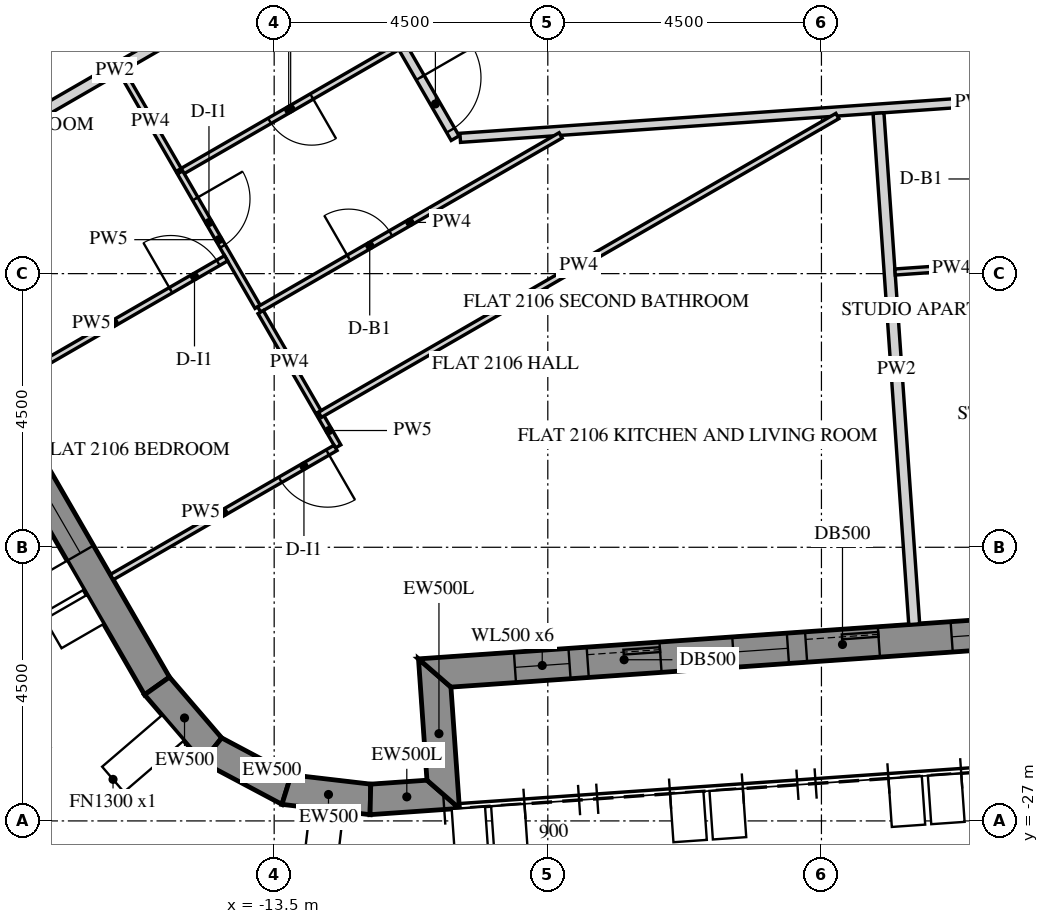
"""IFC4 building model, lengths in metres.
Left out: names, types, materials, properties, quantities, classifications, styles, units other than length and angle.
Written with IfcOpenShell. Run it as: python <this file> out.ifc"""

import sys

from ifc_helpers import new_model, si_unit, direction, frame, frame_2d, origin, place, context, subcontext, project, spatial, polyline, rectangle, outline, extrude, element, fill, save


model = new_model("IFC4")
c1 = context("Model", 3, precision=1e-05, world=origin(), true_north=direction((0.0, 1.0)))
c2 = subcontext(c1, "Body", "Model", "MODEL_VIEW")
j1 = project(units=[si_unit("LENGTHUNIT", "METRE"), si_unit("PLANEANGLEUNIT", "RADIAN")], contexts=[c1])
p1 = place(None, origin())
s1 = spatial("IfcSite", under=j1, at=p1, CompositionType="ELEMENT")
p2 = place(p1, origin())
s2 = spatial("IfcBuilding", under=s1, at=p2, CompositionType="ELEMENT")
p3 = place(p2, frame((0.0, 0.0, 267.9)))
s3 = spatial("IfcBuildingStorey", under=s2, at=p3, CompositionType="ELEMENT", Elevation=267.9)
p4 = place(p3, frame((-28.149, -2.745, -0.15), z_axis=(0.0, 0.0, 1.0), x_axis=(0.500003737743, -0.866023245787, 0.0)))
e1 = element("IfcWall", 1, at=p4, inside=s3, PredefinedType="SOLIDWALL", context=c2, shape_type="SweptSolid", body=[
    extrude(outline(polyline([(-0.021, -0.25), (25.468, -0.25), (25.421, 0.25), (0.021, 0.25), (-0.021, -0.25)])), origin(), (0.0, 0.0, 1.0), 3.9),
])
p5 = place(p4, frame((2.522, 0.0, 0.75)))
e2 = element("IfcOpeningElement", 2, at=p5, cuts=e1, PredefinedType="OPENING", context=c2, shape_type="SweptSolid", body=[
    extrude(rectangle(XDim=2.4, YDim=2.7, at=frame_2d((1.2, 1.35))), frame((0.0, 0.26, 0.0), z_axis=(0.0, -1.0, 0.0), x_axis=(1.0, 0.0, 0.0)), (0.0, 0.0, 1.0), 0.52),
])
p6 = place(p4, frame((6.122, 0.0, 0.75)))
e3 = element("IfcOpeningElement", 3, at=p6, cuts=e1, PredefinedType="OPENING", context=c2, shape_type="SweptSolid", body=[
    extrude(rectangle(XDim=2.4, YDim=2.7, at=frame_2d((1.2, 1.35))), frame((0.0, 0.26, 0.0), z_axis=(0.0, -1.0, 0.0), x_axis=(1.0, 0.0, 0.0)), (0.0, 0.0, 1.0), 0.52),
])
p7 = place(p4, frame((9.722, 0.0, 0.75)))
e4 = element("IfcOpeningElement", 4, at=p7, cuts=e1, PredefinedType="OPENING", context=c2, shape_type="SweptSolid", body=[
    extrude(rectangle(XDim=2.4, YDim=2.7, at=frame_2d((1.2, 1.35))), frame((0.0, 0.26, 0.0), z_axis=(0.0, -1.0, 0.0), x_axis=(1.0, 0.0, 0.0)), (0.0, 0.0, 1.0), 0.52),
])
p8 = place(p4, frame((13.323, 0.0, 0.75)))
e5 = element("IfcOpeningElement", 5, at=p8, cuts=e1, PredefinedType="OPENING", context=c2, shape_type="SweptSolid", body=[
    extrude(rectangle(XDim=2.4, YDim=2.7, at=frame_2d((1.2, 1.35))), frame((0.0, 0.26, 0.0), z_axis=(0.0, -1.0, 0.0), x_axis=(1.0, 0.0, 0.0)), (0.0, 0.0, 1.0), 0.52),
])
p9 = place(p4, frame((16.922, 0.0, 0.75)))
e6 = element("IfcOpeningElement", 6, at=p9, cuts=e1, PredefinedType="OPENING", context=c2, shape_type="SweptSolid", body=[
    extrude(rectangle(XDim=2.4, YDim=2.7, at=frame_2d((1.2, 1.35))), frame((0.0, 0.26, 0.0), z_axis=(0.0, -1.0, 0.0), x_axis=(1.0, 0.0, 0.0)), (0.0, 0.0, 1.0), 0.52),
])
p10 = place(p4, frame((20.522, 0.0, 0.75)))
e7 = element("IfcOpeningElement", 7, at=p10, cuts=e1, PredefinedType="OPENING", context=c2, shape_type="SweptSolid", body=[
    extrude(rectangle(XDim=2.4, YDim=2.7, at=frame_2d((1.2, 1.35))), frame((0.0, 0.26, 0.0), z_axis=(0.0, -1.0, 0.0), x_axis=(1.0, 0.0, 0.0)), (0.0, 0.0, 1.0), 0.52),
])
p11 = place(p3, frame((-15.427, -24.78, -0.15), z_axis=(0.0, 0.0, 1.0), x_axis=(0.651616566281, -0.758548515619, 0.0)))
e8 = element("IfcWall", 8, at=p11, inside=s3, PredefinedType="SOLIDWALL", context=c2, shape_type="SweptSolid", body=[
    extrude(outline(polyline([(-0.023, -0.25), (1.435, -0.25), (1.341, 0.25), (0.023, 0.25), (-0.023, -0.25)])), origin(), (0.0, 0.0, 1.0), 3.9),
])
p12 = place(p3, frame((-14.522, -25.833, -0.15), z_axis=(0.0, 0.0, 1.0), x_axis=(0.882926676147, -0.469510899286, 0.0)))
e9 = element("IfcWall", 9, at=p12, inside=s3, PredefinedType="SOLIDWALL", context=c2, shape_type="SweptSolid", body=[
    extrude(outline(polyline([(-0.047, -0.25), (1.436, -0.25), (1.341, 0.25), (0.047, 0.25), (-0.047, -0.25)])), origin(), (0.0, 0.0, 1.0), 3.9),
])
p13 = place(p3, frame((-13.296, -26.485, -0.15), z_axis=(0.0, 0.0, 1.0), x_axis=(0.993239161627, -0.116086036245, 0.0)))
e10 = element("IfcWall", 10, at=p13, inside=s3, PredefinedType="SOLIDWALL", context=c2, shape_type="SweptSolid", body=[
    extrude(outline(polyline([(-0.047, -0.25), (1.411, -0.25), (1.365, 0.25), (0.047, 0.25), (-0.047, -0.25)])), origin(), (0.0, 0.0, 1.0), 3.9),
])
p14 = place(p3, frame((-11.917, -26.646, -0.15), z_axis=(0.0, 0.0, 1.0), x_axis=(0.997562933087, 0.069772448216, 0.0)))
e11 = element("IfcWall", 11, at=p14, inside=s3, PredefinedType="SOLIDWALL", context=c2, shape_type="SweptSolid", body=[
    extrude(outline(polyline([(-0.023, -0.25), (1.45, -0.25), (0.95, 0.25), (0.023, 0.25), (-0.023, -0.25)])), origin(), (0.0, 0.0, 1.0), 3.9),
])
p15 = place(p3, frame((-10.72, -26.562, -0.15), z_axis=(0.0, 0.0, 1.0), x_axis=(-0.069824268692, 0.99755930726, 0.0)))
e12 = element("IfcWall", 12, at=p15, inside=s3, PredefinedType="SOLIDWALL", context=c2, shape_type="SweptSolid", body=[
    extrude(outline(polyline([(-0.25, -0.25), (1.75, -0.25), (2.25, 0.25), (0.25, 0.25), (-0.25, -0.25)])), origin(), (0.0, 0.0, 1.0), 3.9),
])
p16 = place(p3, frame((-10.86, -24.567, -0.15), z_axis=(0.0, 0.0, 1.0), x_axis=(0.997564329317, 0.06975248292, 0.0)))
e13 = element("IfcWall", 13, at=p16, inside=s3, PredefinedType="SOLIDWALL", context=c2, shape_type="SweptSolid", body=[
    extrude(outline(polyline([(0.25, -0.25), (22.795, -0.25), (23.295, 0.25), (-0.25, 0.25), (0.25, -0.25)])), origin(), (0.0, 0.0, 1.0), 3.9),
])
p17 = place(p16, frame((1.323, 0.0, 1.05)))
e14 = element("IfcOpeningElement", 14, at=p17, cuts=e13, PredefinedType="OPENING", context=c2, shape_type="SweptSolid", body=[
    extrude(rectangle(XDim=0.9, YDim=1.5, at=frame_2d((0.45, 0.75))), frame((0.0, 0.26, 0.0), z_axis=(0.0, -1.0, 0.0), x_axis=(1.0, 0.0, 0.0)), (0.0, 0.0, 1.0), 0.52),
])
p18 = place(p16, frame((2.522, 0.0, 0.15)))
e15 = element("IfcOpeningElement", 15, at=p18, cuts=e13, PredefinedType="OPENING", context=c2, shape_type="SweptSolid", body=[
    extrude(rectangle(XDim=1.2, YDim=2.4, at=frame_2d((0.6, 1.2))), frame((0.0, 0.26, 0.0), z_axis=(0.0, -1.0, 0.0), x_axis=(1.0, 0.0, 0.0)), (0.0, 0.0, 1.0), 0.52),
])
p19 = place(p16, frame((4.922, 0.0, 1.05)))
e16 = element("IfcOpeningElement", 16, at=p19, cuts=e13, PredefinedType="OPENING", context=c2, shape_type="SweptSolid", body=[
    extrude(rectangle(XDim=0.9, YDim=1.5, at=frame_2d((0.45, 0.75))), frame((0.0, 0.26, 0.0), z_axis=(0.0, -1.0, 0.0), x_axis=(1.0, 0.0, 0.0)), (0.0, 0.0, 1.0), 0.52),
])
p20 = place(p16, frame((6.122, 0.0, 0.15)))
e17 = element("IfcOpeningElement", 17, at=p20, cuts=e13, PredefinedType="OPENING", context=c2, shape_type="SweptSolid", body=[
    extrude(rectangle(XDim=1.2, YDim=2.4, at=frame_2d((0.6, 1.2))), frame((0.0, 0.26, 0.0), z_axis=(0.0, -1.0, 0.0), x_axis=(1.0, 0.0, 0.0)), (0.0, 0.0, 1.0), 0.52),
])
p21 = place(p16, frame((8.522, 0.0, 1.05)))
e18 = element("IfcOpeningElement", 18, at=p21, cuts=e13, PredefinedType="OPENING", context=c2, shape_type="SweptSolid", body=[
    extrude(rectangle(XDim=0.9, YDim=1.5, at=frame_2d((0.45, 0.75))), frame((0.0, 0.26, 0.0), z_axis=(0.0, -1.0, 0.0), x_axis=(1.0, 0.0, 0.0)), (0.0, 0.0, 1.0), 0.52),
])
p22 = place(p16, frame((9.722, 0.0, 0.15)))
e19 = element("IfcOpeningElement", 19, at=p22, cuts=e13, PredefinedType="OPENING", context=c2, shape_type="SweptSolid", body=[
    extrude(rectangle(XDim=1.2, YDim=2.4, at=frame_2d((0.6, 1.2))), frame((0.0, 0.26, 0.0), z_axis=(0.0, -1.0, 0.0), x_axis=(1.0, 0.0, 0.0)), (0.0, 0.0, 1.0), 0.52),
])
p23 = place(p16, frame((12.122, 0.0, 1.05)))
e20 = element("IfcOpeningElement", 20, at=p23, cuts=e13, PredefinedType="OPENING", context=c2, shape_type="SweptSolid", body=[
    extrude(rectangle(XDim=0.9, YDim=1.5, at=frame_2d((0.45, 0.75))), frame((0.0, 0.26, 0.0), z_axis=(0.0, -1.0, 0.0), x_axis=(1.0, 0.0, 0.0)), (0.0, 0.0, 1.0), 0.52),
])
p24 = place(p16, frame((13.323, 0.0, 0.15)))
e21 = element("IfcOpeningElement", 21, at=p24, cuts=e13, PredefinedType="OPENING", context=c2, shape_type="SweptSolid", body=[
    extrude(rectangle(XDim=1.2, YDim=2.4, at=frame_2d((0.6, 1.2))), frame((0.0, 0.26, 0.0), z_axis=(0.0, -1.0, 0.0), x_axis=(1.0, 0.0, 0.0)), (0.0, 0.0, 1.0), 0.52),
])
p25 = place(p16, frame((15.722, 0.0, 1.05)))
e22 = element("IfcOpeningElement", 22, at=p25, cuts=e13, PredefinedType="OPENING", context=c2, shape_type="SweptSolid", body=[
    extrude(rectangle(XDim=0.9, YDim=1.5, at=frame_2d((0.45, 0.75))), frame((0.0, 0.26, 0.0), z_axis=(0.0, -1.0, 0.0), x_axis=(1.0, 0.0, 0.0)), (0.0, 0.0, 1.0), 0.52),
])
p26 = place(p16, frame((16.922, 0.0, 0.15)))
e23 = element("IfcOpeningElement", 23, at=p26, cuts=e13, PredefinedType="OPENING", context=c2, shape_type="SweptSolid", body=[
    extrude(rectangle(XDim=1.2, YDim=2.4, at=frame_2d((0.6, 1.2))), frame((0.0, 0.26, 0.0), z_axis=(0.0, -1.0, 0.0), x_axis=(1.0, 0.0, 0.0)), (0.0, 0.0, 1.0), 0.52),
])
p27 = place(p16, frame((19.323, 0.0, 1.05)))
e24 = element("IfcOpeningElement", 24, at=p27, cuts=e13, PredefinedType="OPENING", context=c2, shape_type="SweptSolid", body=[
    extrude(rectangle(XDim=0.9, YDim=1.5, at=frame_2d((0.45, 0.75))), frame((0.0, 0.26, 0.0), z_axis=(0.0, -1.0, 0.0), x_axis=(1.0, 0.0, 0.0)), (0.0, 0.0, 1.0), 0.52),
])
p28 = place(p16, frame((20.522, 0.0, 0.15)))
e25 = element("IfcOpeningElement", 25, at=p28, cuts=e13, PredefinedType="OPENING", context=c2, shape_type="SweptSolid", body=[
    extrude(rectangle(XDim=1.2, YDim=2.4, at=frame_2d((0.6, 1.2))), frame((0.0, 0.26, 0.0), z_axis=(0.0, -1.0, 0.0), x_axis=(1.0, 0.0, 0.0)), (0.0, 0.0, 1.0), 0.52),
])
p29 = place(p3, frame((-17.998, -2.826, 0.0), z_axis=(0.0, 0.0, 1.0), x_axis=(0.500003306199, -0.866023494941, 0.0)))
e26 = element("IfcWall", 26, at=p29, inside=s3, PredefinedType="PARTITIONING", context=c2, shape_type="SweptSolid", body=[
    extrude(rectangle(XDim=14.949, YDim=0.15, at=frame_2d((7.475, 0.0))), origin(), (0.0, 0.0, 1.0), 2.988),
])
p30 = place(p29, frame((2.925, 0.0, 0.0)))
e27 = element("IfcOpeningElement", 27, at=p30, cuts=e26, PredefinedType="OPENING", context=c2, shape_type="SweptSolid", body=[
    extrude(rectangle(XDim=1.0, YDim=2.1, at=frame_2d((0.5, 1.05))), frame((0.0, 0.085, 0.0), z_axis=(0.0, -1.0, 0.0), x_axis=(1.0, 0.0, 0.0)), (0.0, 0.0, 1.0), 0.17),
])
p31 = place(p29, frame((13.799, 0.0, 0.0)))
e28 = element("IfcOpeningElement", 28, at=p31, cuts=e26, PredefinedType="OPENING", context=c2, shape_type="SweptSolid", body=[
    extrude(rectangle(XDim=1.0, YDim=2.1, at=frame_2d((0.5, 1.05))), frame((0.0, 0.085, 0.0), z_axis=(0.0, -1.0, 0.0), x_axis=(1.0, 0.0, 0.0)), (0.0, 0.0, 1.0), 0.17),
])
p32 = place(p3, frame((-10.44, -15.767, 0.0), z_axis=(0.0, 0.0, 1.0), x_axis=(0.997565037323, 0.069742356651, 0.0)))
e29 = element("IfcWall", 29, at=p32, inside=s3, PredefinedType="PARTITIONING", context=c2, shape_type="SweptSolid", body=[
    extrude(rectangle(XDim=16.939, YDim=0.15, at=frame_2d((8.47, 0.0))), origin(), (0.0, 0.0, 1.0), 2.988),
])
p33 = place(p32, frame((9.79, 0.0, 0.0)))
e30 = element("IfcOpeningElement", 30, at=p33, cuts=e29, PredefinedType="OPENING", context=c2, shape_type="SweptSolid", body=[
    extrude(rectangle(XDim=1.0, YDim=2.1, at=frame_2d((0.5, 1.05))), frame((0.0, 0.085, 0.0), z_axis=(0.0, -1.0, 0.0), x_axis=(1.0, 0.0, 0.0)), (0.0, 0.0, 1.0), 0.17),
])
p34 = place(p32, frame((15.39, 0.0, 0.0)))
e31 = element("IfcOpeningElement", 31, at=p34, cuts=e29, PredefinedType="OPENING", context=c2, shape_type="SweptSolid", body=[
    extrude(rectangle(XDim=1.0, YDim=2.1, at=frame_2d((0.5, 1.05))), frame((0.0, 0.085, 0.0), z_axis=(0.0, -1.0, 0.0), x_axis=(1.0, 0.0, 0.0)), (0.0, 0.0, 1.0), 0.17),
])
p35 = place(p3, frame((-19.771, -16.755, 0.0), z_axis=(0.0, 0.0, 1.0), x_axis=(0.866026819143, 0.499997548519, 0.0)))
e32 = element("IfcWall", 32, at=p35, inside=s3, PredefinedType="PARTITIONING", context=c2, shape_type="SweptSolid", body=[
    extrude(rectangle(XDim=8.425, YDim=0.18, at=frame_2d((4.212, 0.0))), origin(), (0.0, 0.0, 1.0), 2.988),
])
p36 = place(p3, frame((-12.748, -20.319, 0.0), z_axis=(0.0, 0.0, 1.0), x_axis=(0.500108649621, -0.865962665808, 0.0)))
e33 = element("IfcWall", 33, at=p36, inside=s3, PredefinedType="PARTITIONING", context=c2, shape_type="SweptSolid", body=[
    extrude(rectangle(XDim=0.602, YDim=0.1, at=frame_2d((0.301, 0.0))), origin(), (0.0, 0.0, 1.0), 2.988),
])
p37 = place(p3, frame((-12.491, -20.865, 0.0), z_axis=(0.0, 0.0, 1.0), x_axis=(-0.866014341725, -0.50001915956, 0.0)))
e34 = element("IfcWall", 34, at=p37, inside=s3, PredefinedType="PARTITIONING", context=c2, shape_type="SweptSolid", body=[
    extrude(rectangle(XDim=4.25, YDim=0.1, at=frame_2d((2.125, 0.0))), origin(), (0.0, 0.0, 1.0), 2.988),
])
p38 = place(p37, frame((0.15, 0.0, 0.0)))
e35 = element("IfcOpeningElement", 35, at=p38, cuts=e34, PredefinedType="OPENING", context=c2, shape_type="SweptSolid", body=[
    extrude(rectangle(XDim=0.9, YDim=2.1, at=frame_2d((0.45, 1.05))), frame((0.0, 0.06, 0.0), z_axis=(0.0, -1.0, 0.0), x_axis=(1.0, 0.0, 0.0)), (0.0, 0.0, 1.0), 0.12),
])
p39 = place(p3, frame((-4.238, -15.408, 0.0), z_axis=(0.0, 0.0, 1.0), x_axis=(-0.86602504101, -0.500000628343, 0.0)))
e36 = element("IfcWall", 36, at=p39, inside=s3, PredefinedType="PARTITIONING", context=c2, shape_type="SweptSolid", body=[
    extrude(rectangle(XDim=9.826, YDim=0.1, at=frame_2d((4.913, 0.0))), origin(), (0.0, 0.0, 1.0), 2.988),
])
p40 = place(p3, frame((-2.974, -23.765, 0.0), z_axis=(0.0, 0.0, 1.0), x_axis=(-0.069749826803, 0.997564515037, 0.0)))
e37 = element("IfcWall", 37, at=p40, inside=s3, PredefinedType="PARTITIONING", context=c2, shape_type="SweptSolid", body=[
    extrude(rectangle(XDim=8.425, YDim=0.18, at=frame_2d((4.212, 0.0))), origin(), (0.0, 0.0, 1.0), 2.988),
])
p41 = place(p3, frame((-11.475, -14.275, 0.0), z_axis=(0.0, 0.0, 1.0), x_axis=(-0.866019999656, -0.500009360108, 0.0)))
e38 = element("IfcWall", 38, at=p41, inside=s3, PredefinedType="PARTITIONING", context=c2, shape_type="SweptSolid", body=[
    extrude(rectangle(XDim=4.125, YDim=0.1, at=frame_2d((2.062, 0.0))), origin(), (0.0, 0.0, 1.0), 2.988),
])
p42 = place(p41, frame((1.625, 0.0, 0.0)))
e39 = element("IfcOpeningElement", 39, at=p42, cuts=e38, PredefinedType="OPENING", context=c2, shape_type="SweptSolid", body=[
    extrude(rectangle(XDim=0.8, YDim=2.1, at=frame_2d((0.4, 1.05))), frame((0.0, 0.06, 0.0), z_axis=(0.0, -1.0, 0.0), x_axis=(1.0, 0.0, 0.0)), (0.0, 0.0, 1.0), 0.12),
])
p43 = place(p3, frame((-15.048, -16.335, 0.0), z_axis=(0.0, 0.0, 1.0), x_axis=(0.500014808323, -0.866016854026, 0.0)))
e40 = element("IfcWall", 40, at=p43, inside=s3, PredefinedType="PARTITIONING", context=c2, shape_type="SweptSolid", body=[
    extrude(rectangle(XDim=2.554, YDim=0.1, at=frame_2d((1.277, 0.0))), origin(), (0.0, 0.0, 1.0), 2.988),
])
p44 = place(p43, frame((0.502, 0.0, 0.0)))
e41 = element("IfcOpeningElement", 41, at=p44, cuts=e40, PredefinedType="OPENING", context=c2, shape_type="SweptSolid", body=[
    extrude(rectangle(XDim=0.9, YDim=2.1, at=frame_2d((0.45, 1.05))), frame((0.0, 0.06, 0.0), z_axis=(0.0, -1.0, 0.0), x_axis=(1.0, 0.0, 0.0)), (0.0, 0.0, 1.0), 0.12),
])
p45 = place(p3, frame((-13.747, -18.589, 0.0), z_axis=(0.0, 0.0, 1.0), x_axis=(0.866022251081, 0.500005460603, 0.0)))
e42 = element("IfcWall", 42, at=p45, inside=s3, PredefinedType="PARTITIONING", context=c2, shape_type="SweptSolid", body=[
    extrude(rectangle(XDim=5.725, YDim=0.1, at=frame_2d((2.863, 0.0))), origin(), (0.0, 0.0, 1.0), 2.988),
])
p46 = place(p45, frame((1.7, 0.0, 0.0)))
e43 = element("IfcOpeningElement", 43, at=p46, cuts=e42, PredefinedType="OPENING", context=c2, shape_type="SweptSolid", body=[
    extrude(rectangle(XDim=0.8, YDim=2.1, at=frame_2d((0.4, 1.05))), frame((0.0, 0.06, 0.0), z_axis=(0.0, -1.0, 0.0), x_axis=(1.0, 0.0, 0.0)), (0.0, 0.0, 1.0), 0.12),
])
p47 = place(p3, frame((-16.002, -14.683, 0.0), z_axis=(0.0, 0.0, 1.0), x_axis=(0.500059143742, -0.865991254436, 0.0)))
e44 = element("IfcWall", 44, at=p47, inside=s3, PredefinedType="PARTITIONING", context=c2, shape_type="SweptSolid", body=[
    extrude(rectangle(XDim=1.862, YDim=0.1, at=frame_2d((0.931, 0.0))), origin(), (0.0, 0.0, 1.0), 2.988),
])
p48 = place(p3, frame((-17.971, -19.873, 0.0), z_axis=(0.0, 0.0, 1.0), x_axis=(0.866028703517, 0.499994284652, 0.0)))
e45 = element("IfcWall", 45, at=p48, inside=s3, PredefinedType="PARTITIONING", context=c2, shape_type="SweptSolid", body=[
    extrude(rectangle(XDim=4.25, YDim=0.1, at=frame_2d((2.125, 0.0))), origin(), (0.0, 0.0, 1.0), 2.988),
])
p49 = place(p48, frame((3.2, 0.0, 0.0)))
e46 = element("IfcOpeningElement", 46, at=p49, cuts=e45, PredefinedType="OPENING", context=c2, shape_type="SweptSolid", body=[
    extrude(rectangle(XDim=0.9, YDim=2.1, at=frame_2d((0.45, 1.05))), frame((0.0, 0.06, 0.0), z_axis=(0.0, -1.0, 0.0), x_axis=(1.0, 0.0, 0.0)), (0.0, 0.0, 1.0), 0.12),
])
p50 = place(p3, frame((-12.772, -20.278, 0.0), z_axis=(0.0, 0.0, 1.0), x_axis=(-0.499967155389, 0.866044365799, 0.0)))
e47 = element("IfcWall", 47, at=p50, inside=s3, PredefinedType="PARTITIONING", context=c2, shape_type="SweptSolid", body=[
    extrude(rectangle(XDim=1.9, YDim=0.1, at=frame_2d((0.95, 0.0))), origin(), (0.0, 0.0, 1.0), 2.988),
])
p51 = place(p3, frame((-1.434, -17.844, 0.0), z_axis=(0.0, 0.0, 1.0), x_axis=(-0.997568101915, -0.069698508173, 0.0)))
e48 = element("IfcWall", 48, at=p51, inside=s3, PredefinedType="PARTITIONING", context=c2, shape_type="SweptSolid", body=[
    extrude(rectangle(XDim=1.86, YDim=0.1, at=frame_2d((0.93, 0.0))), origin(), (0.0, 0.0, 1.0), 2.988),
])
p52 = place(p10, frame((0.0, 0.18, 0.0)))
e49 = element("IfcWindow", 49, at=p52, inside=s3, PartitioningType="DOUBLE_PANEL_VERTICAL", PredefinedType="WINDOW", context=c2, shape_type="SweptSolid", body=[
    extrude(rectangle(XDim=2.4, YDim=2.7, at=frame_2d((1.2, 1.35))), frame((0.0, 0.03, 0.0), z_axis=(0.0, -1.0, 0.0), x_axis=(1.0, 0.0, 0.0)), (0.0, 0.0, 1.0), 0.06),
])
fill(e7, e49)
p53 = place(p17, frame((0.0, 0.18, 0.0)))
e50 = element("IfcWindow", 50, at=p53, inside=s3, PartitioningType="SINGLE_PANEL", PredefinedType="WINDOW", context=c2, shape_type="SweptSolid", body=[
    extrude(rectangle(XDim=0.9, YDim=1.5, at=frame_2d((0.45, 0.75))), frame((0.0, 0.03, 0.0), z_axis=(0.0, -1.0, 0.0), x_axis=(1.0, 0.0, 0.0)), (0.0, 0.0, 1.0), 0.06),
])
fill(e14, e50)
p54 = place(p18, frame((0.0, 0.175, 0.0)))
e51 = element("IfcDoor", 51, at=p54, inside=s3, OperationType="SLIDING_TO_LEFT", PredefinedType="DOOR", context=c2, shape_type="SweptSolid", body=[
    extrude(rectangle(XDim=1.2, YDim=2.4, at=frame_2d((0.6, 1.2))), frame((0.0, 0.025, 0.0), z_axis=(0.0, -1.0, 0.0), x_axis=(1.0, 0.0, 0.0)), (0.0, 0.0, 1.0), 0.05),
])
fill(e15, e51)
p55 = place(p19, frame((0.0, 0.18, 0.0)))
e52 = element("IfcWindow", 52, at=p55, inside=s3, PartitioningType="SINGLE_PANEL", PredefinedType="WINDOW", context=c2, shape_type="SweptSolid", body=[
    extrude(rectangle(XDim=0.9, YDim=1.5, at=frame_2d((0.45, 0.75))), frame((0.0, 0.03, 0.0), z_axis=(0.0, -1.0, 0.0), x_axis=(1.0, 0.0, 0.0)), (0.0, 0.0, 1.0), 0.06),
])
fill(e16, e52)
p56 = place(p20, frame((0.0, 0.175, 0.0)))
e53 = element("IfcDoor", 53, at=p56, inside=s3, OperationType="SLIDING_TO_LEFT", PredefinedType="DOOR", context=c2, shape_type="SweptSolid", body=[
    extrude(rectangle(XDim=1.2, YDim=2.4, at=frame_2d((0.6, 1.2))), frame((0.0, 0.025, 0.0), z_axis=(0.0, -1.0, 0.0), x_axis=(1.0, 0.0, 0.0)), (0.0, 0.0, 1.0), 0.05),
])
fill(e17, e53)
p57 = place(p21, frame((0.0, 0.18, 0.0)))
e54 = element("IfcWindow", 54, at=p57, inside=s3, PartitioningType="SINGLE_PANEL", PredefinedType="WINDOW", context=c2, shape_type="SweptSolid", body=[
    extrude(rectangle(XDim=0.9, YDim=1.5, at=frame_2d((0.45, 0.75))), frame((0.0, 0.03, 0.0), z_axis=(0.0, -1.0, 0.0), x_axis=(1.0, 0.0, 0.0)), (0.0, 0.0, 1.0), 0.06),
])
fill(e18, e54)
p58 = place(p31, origin())
e55 = element("IfcDoor", 55, at=p58, inside=s3, OperationType="SINGLE_SWING_LEFT", PredefinedType="DOOR", context=c2, shape_type="SweptSolid", body=[
    extrude(rectangle(XDim=1.0, YDim=2.1, at=frame_2d((0.5, 1.05))), frame((0.0, 0.025, 0.0), z_axis=(0.0, -1.0, 0.0), x_axis=(1.0, 0.0, 0.0)), (0.0, 0.0, 1.0), 0.05),
])
fill(e28, e55)
p59 = place(p42, origin())
e56 = element("IfcDoor", 56, at=p59, inside=s3, OperationType="SINGLE_SWING_RIGHT", PredefinedType="DOOR", context=c2, shape_type="SweptSolid", body=[
    extrude(rectangle(XDim=0.8, YDim=2.1, at=frame_2d((0.4, 1.05))), frame((0.0, 0.025, 0.0), z_axis=(0.0, -1.0, 0.0), x_axis=(1.0, 0.0, 0.0)), (0.0, 0.0, 1.0), 0.05),
])
fill(e39, e56)
p60 = place(p44, origin())
e57 = element("IfcDoor", 57, at=p60, inside=s3, OperationType="SINGLE_SWING_LEFT", PredefinedType="DOOR", context=c2, shape_type="SweptSolid", body=[
    extrude(rectangle(XDim=0.9, YDim=2.1, at=frame_2d((0.45, 1.05))), frame((0.0, 0.025, 0.0), z_axis=(0.0, -1.0, 0.0), x_axis=(1.0, 0.0, 0.0)), (0.0, 0.0, 1.0), 0.05),
])
fill(e41, e57)
p61 = place(p49, origin())
e58 = element("IfcDoor", 58, at=p61, inside=s3, OperationType="SINGLE_SWING_RIGHT", PredefinedType="DOOR", context=c2, shape_type="SweptSolid", body=[
    extrude(rectangle(XDim=0.9, YDim=2.1, at=frame_2d((0.45, 1.05))), frame((0.0, 0.025, 0.0), z_axis=(0.0, -1.0, 0.0), x_axis=(1.0, 0.0, 0.0)), (0.0, 0.0, 1.0), 0.05),
])
fill(e46, e58)
p62 = place(p38, origin())
e59 = element("IfcDoor", 59, at=p62, inside=s3, OperationType="SINGLE_SWING_RIGHT", PredefinedType="DOOR", context=c2, shape_type="SweptSolid", body=[
    extrude(rectangle(XDim=0.9, YDim=2.1, at=frame_2d((0.45, 1.05))), frame((0.0, 0.025, 0.0), z_axis=(0.0, -1.0, 0.0), x_axis=(1.0, 0.0, 0.0)), (0.0, 0.0, 1.0), 0.05),
])
fill(e35, e59)
p63 = place(p46, origin())
e60 = element("IfcDoor", 60, at=p63, inside=s3, OperationType="SINGLE_SWING_RIGHT", PredefinedType="DOOR", context=c2, shape_type="SweptSolid", body=[
    extrude(rectangle(XDim=0.8, YDim=2.1, at=frame_2d((0.4, 1.05))), frame((0.0, 0.025, 0.0), z_axis=(0.0, -1.0, 0.0), x_axis=(1.0, 0.0, 0.0)), (0.0, 0.0, 1.0), 0.05),
])
fill(e43, e60)
save(model, sys.argv[1])
